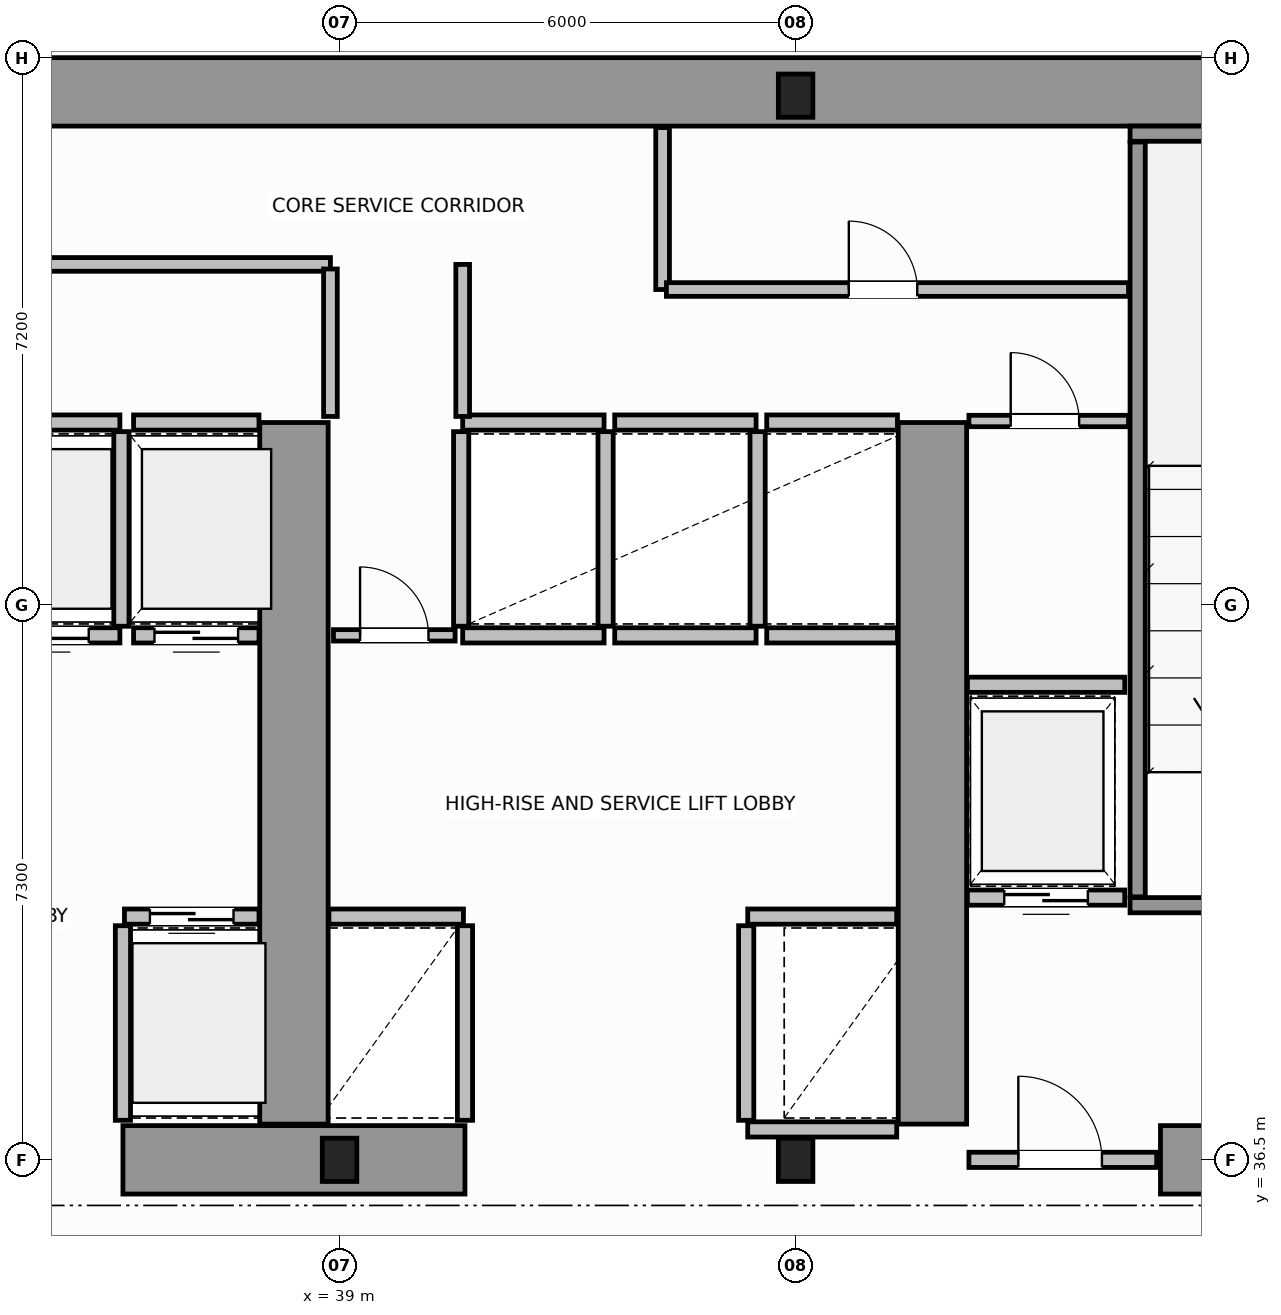
"""IFC4 building model, lengths in metres.
Left out: names, types, materials, properties, quantities, classifications, styles, units other than length and angle.
Written with IfcOpenShell. Run it as: python <this file> out.ifc"""

import sys

from ifc_helpers import new_model, si_unit, direction, frame, frame_2d, origin, origin_2d, place, context, subcontext, project, spatial, rectangle, i_section, extrude, source, transform, mapped, element, fill, save


model = new_model("IFC4")
c1 = context("Model", 3, precision=1e-05, world=origin(), true_north=direction((0.0, 1.0)))
c2 = subcontext(c1, "Body", "Model", "MODEL_VIEW")
j1 = project(units=[si_unit("LENGTHUNIT", "METRE"), si_unit("PLANEANGLEUNIT", "RADIAN")], contexts=[c1])
p1 = place(None, origin())
s1 = spatial("IfcSite", under=j1, at=p1, CompositionType="ELEMENT")
p2 = place(p1, origin())
s2 = spatial("IfcBuilding", under=s1, at=p2, CompositionType="ELEMENT")
p3 = place(p2, frame((0.0, 0.0, 14.4)))
s3 = spatial("IfcBuildingStorey", under=s2, at=p3, CompositionType="ELEMENT", Elevation=14.4)
m1 = source(origin(), c2, "Body", "SweptSolid", [
    extrude(i_section(OverallWidth=0.454, OverallDepth=0.569, WebThickness=0.078, FlangeThickness=0.08, FilletRadius=0.015, at=origin_2d()), origin(), (0.0, 0.0, 1.0), 4.4),
])
for number, where, z_axis, x_axis in (
    (1, (39.0, 36.5, 0.0), (0.0, 0.0, 1.0), (1.0, 0.0, 0.0)),
    (2, (45.0, 36.5, 0.0), (0.0, 0.0, 1.0), (1.0, 0.0, 0.0)),
    (3, (45.0, 50.5, 0.0), (0.0, 0.0, 1.0), (1.0, 0.0, 0.0)),
):
    element("IfcColumn", number, at=place(p3, frame(where, z_axis=z_axis, x_axis=x_axis)), inside=s3, PredefinedType="COLUMN", context=c2, shape_type="MappedRepresentation", body=[
        mapped(m1, transform((0.0, 0.0, 0.0), scale=1.0)),
    ])
p4 = place(p3, frame((34.002, 50.55, 0.0), z_axis=(0.0, 0.0, 1.0), x_axis=(1.0, 0.0, 0.0)))
e4 = element("IfcWall", 4, at=p4, inside=s3, PredefinedType="SHEAR", context=c2, shape_type="SweptSolid", body=[
    extrude(rectangle(XDim=19.544, YDim=0.9, at=frame_2d((9.772, 0.0))), origin(), (0.0, 0.0, 1.0), 4.4),
])
p5 = place(p3, frame((36.15, 36.5, 0.0), z_axis=(0.0, 0.0, 1.0), x_axis=(1.0, 0.0, 0.0)))
e5 = element("IfcWall", 5, at=p5, inside=s3, PredefinedType="SHEAR", context=c2, shape_type="SweptSolid", body=[
    extrude(rectangle(XDim=4.5, YDim=0.9, at=frame_2d((2.25, 0.0))), origin(), (0.0, 0.0, 1.0), 4.4),
])
p6 = place(p3, frame((49.8, 36.5, 0.0), z_axis=(0.0, 0.0, 1.0), x_axis=(1.0, 0.0, 0.0)))
e6 = element("IfcWall", 6, at=p6, inside=s3, PredefinedType="SHEAR", context=c2, shape_type="SweptSolid", body=[
    extrude(rectangle(XDim=3.73, YDim=0.9, at=frame_2d((1.865, 0.0))), origin(), (0.0, 0.0, 1.0), 2.92),
])
for number, where, z_axis, x_axis in (
    (7, (38.4, 36.97, 0.0), (0.0, 0.0, 1.0), (0.0, 1.0, 0.0)),
    (8, (46.8, 36.97, 0.0), (0.0, 0.0, 1.0), (0.0, 1.0, 0.0)),
):
    element("IfcWall", number, at=place(p3, frame(where, z_axis=z_axis, x_axis=x_axis)), inside=s3, PredefinedType="SHEAR", context=c2, shape_type="SweptSolid", body=[
        extrude(rectangle(XDim=9.23, YDim=0.9, at=frame_2d((4.615, 0.0))), origin(), (0.0, 0.0, 1.0), 4.4),
    ])
p7 = place(p3, frame((49.4, 39.85, 0.0), z_axis=(0.0, 0.0, 1.0), x_axis=(1.0, 0.0, 0.0)))
e9 = element("IfcWall", 9, at=p7, inside=s3, PredefinedType="SOLIDWALL", context=c2, shape_type="SweptSolid", body=[
    extrude(rectangle(XDim=4.15, YDim=0.2, at=frame_2d((2.075, 0.0))), origin(), (0.0, 0.0, 1.0), 4.4),
])
p8 = place(p7, frame((1.325, 0.0, 0.0)))
e10 = element("IfcOpeningElement", 10, at=p8, cuts=e9, PredefinedType="OPENING", context=c2, shape_type="SweptSolid", body=[
    extrude(rectangle(XDim=1.1, YDim=2.15, at=frame_2d((0.55, 1.075))), frame((0.0, 0.11, 0.0), z_axis=(0.0, -1.0, 0.0), x_axis=(1.0, 0.0, 0.0)), (0.0, 0.0, 1.0), 0.22),
])
p9 = place(p3, frame((49.4, 50.0, 0.0), z_axis=(0.0, 0.0, 1.0), x_axis=(1.0, 0.0, 0.0)))
e11 = element("IfcWall", 11, at=p9, inside=s3, PredefinedType="SOLIDWALL", context=c2, shape_type="SweptSolid", body=[
    extrude(rectangle(XDim=4.15, YDim=0.2, at=frame_2d((2.075, 0.0))), origin(), (0.0, 0.0, 1.0), 4.4),
])
p10 = place(p3, frame((49.5, 39.96, 0.0), z_axis=(0.0, 0.0, 1.0), x_axis=(0.0, 1.0, 0.0)))
e12 = element("IfcWall", 12, at=p10, inside=s3, PredefinedType="SOLIDWALL", context=c2, shape_type="SweptSolid", body=[
    extrude(rectangle(XDim=9.93, YDim=0.2, at=frame_2d((4.965, 0.0))), origin(), (0.0, 0.0, 1.0), 4.4),
])
p11 = place(p3, frame((47.28, 36.5, 0.0), z_axis=(0.0, 0.0, 1.0), x_axis=(1.0, 0.0, 0.0)))
e13 = element("IfcWall", 13, at=p11, inside=s3, PredefinedType="SOLIDWALL", context=c2, shape_type="SweptSolid", body=[
    extrude(rectangle(XDim=2.47, YDim=0.2, at=frame_2d((1.235, 0.0))), origin(), (0.0, 0.0, 1.0), 2.91),
])
p12 = place(p11, frame((0.65, 0.0, 0.0)))
e14 = element("IfcOpeningElement", 14, at=p12, cuts=e13, PredefinedType="OPENING", context=c2, shape_type="SweptSolid", body=[
    extrude(rectangle(XDim=1.1, YDim=2.15, at=frame_2d((0.55, 1.075))), frame((0.0, 0.11, 0.0), z_axis=(0.0, -1.0, 0.0), x_axis=(1.0, 0.0, 0.0)), (0.0, 0.0, 1.0), 0.22),
])
p13 = place(p3, frame((36.17, 39.7, 0.0), z_axis=(0.0, 0.0, 1.0), x_axis=(1.0, 0.0, 0.0)))
e15 = element("IfcWall", 15, at=p13, inside=s3, PredefinedType="SOLIDWALL", context=c2, shape_type="SweptSolid", body=[
    extrude(rectangle(XDim=1.77, YDim=0.2, at=frame_2d((0.885, 0.0))), origin(), (0.0, 0.0, 1.0), 4.12),
])
p14 = place(p13, frame((0.335, 0.0, 0.0)))
e16 = element("IfcOpeningElement", 16, at=p14, cuts=e15, PredefinedType="OPENING", context=c2, shape_type="SweptSolid", body=[
    extrude(rectangle(XDim=1.1, YDim=2.15, at=frame_2d((0.55, 1.075))), frame((0.0, 0.11, 0.0), z_axis=(0.0, -1.0, 0.0), x_axis=(1.0, 0.0, 0.0)), (0.0, 0.0, 1.0), 0.22),
])
p15 = place(p3, frame((36.15, 37.02, 0.0), z_axis=(0.0, 0.0, 1.0), x_axis=(0.0, 1.0, 0.0)))
e17 = element("IfcWall", 17, at=p15, inside=s3, PredefinedType="SOLIDWALL", context=c2, shape_type="SweptSolid", body=[
    extrude(rectangle(XDim=2.56, YDim=0.2, at=frame_2d((1.28, 0.0))), origin(), (0.0, 0.0, 1.0), 4.12),
])
p16 = place(p3, frame((34.19, 43.4, 0.0), z_axis=(0.0, 0.0, 1.0), x_axis=(1.0, 0.0, 0.0)))
e18 = element("IfcWall", 18, at=p16, inside=s3, PredefinedType="SOLIDWALL", context=c2, shape_type="SweptSolid", body=[
    extrude(rectangle(XDim=1.92, YDim=0.2, at=frame_2d((0.96, 0.0))), origin(), (0.0, 0.0, 1.0), 4.12),
])
p17 = place(p16, frame((0.41, 0.0, 0.0)))
e19 = element("IfcOpeningElement", 19, at=p17, cuts=e18, PredefinedType="OPENING", context=c2, shape_type="SweptSolid", body=[
    extrude(rectangle(XDim=1.1, YDim=2.15, at=frame_2d((0.55, 1.075))), frame((0.0, 0.11, 0.0), z_axis=(0.0, -1.0, 0.0), x_axis=(1.0, 0.0, 0.0)), (0.0, 0.0, 1.0), 0.22),
])
p18 = place(p3, frame((34.19, 46.2, 0.0), z_axis=(0.0, 0.0, 1.0), x_axis=(1.0, 0.0, 0.0)))
e20 = element("IfcWall", 20, at=p18, inside=s3, PredefinedType="SOLIDWALL", context=c2, shape_type="SweptSolid", body=[
    extrude(rectangle(XDim=1.92, YDim=0.2, at=frame_2d((0.96, 0.0))), origin(), (0.0, 0.0, 1.0), 4.12),
])
p19 = place(p3, frame((36.13, 43.52, 0.0), z_axis=(0.0, 0.0, 1.0), x_axis=(0.0, 1.0, 0.0)))
e21 = element("IfcWall", 21, at=p19, inside=s3, PredefinedType="SOLIDWALL", context=c2, shape_type="SweptSolid", body=[
    extrude(rectangle(XDim=2.56, YDim=0.2, at=frame_2d((1.28, 0.0))), origin(), (0.0, 0.0, 1.0), 4.12),
])
p20 = place(p3, frame((36.29, 43.4, 0.0), z_axis=(0.0, 0.0, 1.0), x_axis=(1.0, 0.0, 0.0)))
e22 = element("IfcWall", 22, at=p20, inside=s3, PredefinedType="SOLIDWALL", context=c2, shape_type="SweptSolid", body=[
    extrude(rectangle(XDim=1.65, YDim=0.2, at=frame_2d((0.825, 0.0))), origin(), (0.0, 0.0, 1.0), 4.12),
])
p21 = place(p20, frame((0.275, 0.0, 0.0)))
e23 = element("IfcOpeningElement", 23, at=p21, cuts=e22, PredefinedType="OPENING", context=c2, shape_type="SweptSolid", body=[
    extrude(rectangle(XDim=1.1, YDim=2.15, at=frame_2d((0.55, 1.075))), frame((0.0, 0.11, 0.0), z_axis=(0.0, -1.0, 0.0), x_axis=(1.0, 0.0, 0.0)), (0.0, 0.0, 1.0), 0.22),
])
p22 = place(p3, frame((36.29, 46.2, 0.0), z_axis=(0.0, 0.0, 1.0), x_axis=(1.0, 0.0, 0.0)))
e24 = element("IfcWall", 24, at=p22, inside=s3, PredefinedType="SOLIDWALL", context=c2, shape_type="SweptSolid", body=[
    extrude(rectangle(XDim=1.65, YDim=0.2, at=frame_2d((0.825, 0.0))), origin(), (0.0, 0.0, 1.0), 4.12),
])
p23 = place(p3, frame((38.86, 39.7, 0.0), z_axis=(0.0, 0.0, 1.0), x_axis=(1.0, 0.0, 0.0)))
e25 = element("IfcWall", 25, at=p23, inside=s3, PredefinedType="SOLIDWALL", context=c2, shape_type="SweptSolid", body=[
    extrude(rectangle(XDim=1.77, YDim=0.2, at=frame_2d((0.885, 0.0))), origin(), (0.0, 0.0, 1.0), 4.12),
])
p24 = place(p3, frame((40.65, 37.02, 0.0), z_axis=(0.0, 0.0, 1.0), x_axis=(0.0, 1.0, 0.0)))
e26 = element("IfcWall", 26, at=p24, inside=s3, PredefinedType="SOLIDWALL", context=c2, shape_type="SweptSolid", body=[
    extrude(rectangle(XDim=2.56, YDim=0.2, at=frame_2d((1.28, 0.0))), origin(), (0.0, 0.0, 1.0), 4.12),
])
p25 = place(p3, frame((44.37, 39.7, 0.0), z_axis=(0.0, 0.0, 1.0), x_axis=(1.0, 0.0, 0.0)))
e27 = element("IfcWall", 27, at=p25, inside=s3, PredefinedType="SOLIDWALL", context=c2, shape_type="SweptSolid", body=[
    extrude(rectangle(XDim=1.96, YDim=0.2, at=frame_2d((0.98, 0.0))), origin(), (0.0, 0.0, 1.0), 4.12),
])
p26 = place(p3, frame((44.37, 36.9, 0.0), z_axis=(0.0, 0.0, 1.0), x_axis=(1.0, 0.0, 0.0)))
e28 = element("IfcWall", 28, at=p26, inside=s3, PredefinedType="SOLIDWALL", context=c2, shape_type="SweptSolid", body=[
    extrude(rectangle(XDim=1.96, YDim=0.2, at=frame_2d((0.98, 0.0))), origin(), (0.0, 0.0, 1.0), 2.91),
])
p27 = place(p3, frame((44.35, 37.02, 0.0), z_axis=(0.0, 0.0, 1.0), x_axis=(0.0, 1.0, 0.0)))
e29 = element("IfcWall", 29, at=p27, inside=s3, PredefinedType="SOLIDWALL", context=c2, shape_type="SweptSolid", body=[
    extrude(rectangle(XDim=2.56, YDim=0.2, at=frame_2d((1.28, 0.0))), origin(), (0.0, 0.0, 1.0), 4.12),
])
for number, where, z_axis, x_axis in (
    (30, (40.62, 43.4, 0.0), (0.0, 0.0, 1.0), (1.0, 0.0, 0.0)),
    (31, (40.62, 46.2, 0.0), (0.0, 0.0, 1.0), (1.0, 0.0, 0.0)),
):
    element("IfcWall", number, at=place(p3, frame(where, z_axis=z_axis, x_axis=x_axis)), inside=s3, PredefinedType="SOLIDWALL", context=c2, shape_type="SweptSolid", body=[
        extrude(rectangle(XDim=1.86, YDim=0.2, at=frame_2d((0.93, 0.0))), origin(), (0.0, 0.0, 1.0), 4.12),
    ])
for number, where, z_axis, x_axis in (
    (32, (40.6, 43.52, 0.0), (0.0, 0.0, 1.0), (0.0, 1.0, 0.0)),
    (33, (42.5, 43.52, 0.0), (0.0, 0.0, 1.0), (0.0, 1.0, 0.0)),
):
    element("IfcWall", number, at=place(p3, frame(where, z_axis=z_axis, x_axis=x_axis)), inside=s3, PredefinedType="SOLIDWALL", context=c2, shape_type="SweptSolid", body=[
        extrude(rectangle(XDim=2.56, YDim=0.2, at=frame_2d((1.28, 0.0))), origin(), (0.0, 0.0, 1.0), 4.12),
    ])
for number, where, z_axis, x_axis in (
    (34, (42.62, 43.4, 0.0), (0.0, 0.0, 1.0), (1.0, 0.0, 0.0)),
    (35, (42.62, 46.2, 0.0), (0.0, 0.0, 1.0), (1.0, 0.0, 0.0)),
):
    element("IfcWall", number, at=place(p3, frame(where, z_axis=z_axis, x_axis=x_axis)), inside=s3, PredefinedType="SOLIDWALL", context=c2, shape_type="SweptSolid", body=[
        extrude(rectangle(XDim=1.86, YDim=0.2, at=frame_2d((0.93, 0.0))), origin(), (0.0, 0.0, 1.0), 4.12),
    ])
p28 = place(p3, frame((44.5, 43.52, 0.0), z_axis=(0.0, 0.0, 1.0), x_axis=(0.0, 1.0, 0.0)))
e36 = element("IfcWall", 36, at=p28, inside=s3, PredefinedType="SOLIDWALL", context=c2, shape_type="SweptSolid", body=[
    extrude(rectangle(XDim=2.56, YDim=0.2, at=frame_2d((1.28, 0.0))), origin(), (0.0, 0.0, 1.0), 2.91),
])
for number, where, z_axis, x_axis in (
    (37, (44.62, 43.4, 0.0), (0.0, 0.0, 1.0), (1.0, 0.0, 0.0)),
    (38, (44.62, 46.2, 0.0), (0.0, 0.0, 1.0), (1.0, 0.0, 0.0)),
):
    element("IfcWall", number, at=place(p3, frame(where, z_axis=z_axis, x_axis=x_axis)), inside=s3, PredefinedType="SOLIDWALL", context=c2, shape_type="SweptSolid", body=[
        extrude(rectangle(XDim=1.72, YDim=0.2, at=frame_2d((0.86, 0.0))), origin(), (0.0, 0.0, 1.0), 4.12),
    ])
p29 = place(p3, frame((47.26, 39.95, 0.0), z_axis=(0.0, 0.0, 1.0), x_axis=(1.0, 0.0, 0.0)))
e39 = element("IfcWall", 39, at=p29, inside=s3, PredefinedType="SOLIDWALL", context=c2, shape_type="SweptSolid", body=[
    extrude(rectangle(XDim=2.07, YDim=0.2, at=frame_2d((1.035, 0.0))), origin(), (0.0, 0.0, 1.0), 4.12),
])
p30 = place(p29, frame((0.485, 0.0, 0.0)))
e40 = element("IfcOpeningElement", 40, at=p30, cuts=e39, PredefinedType="OPENING", context=c2, shape_type="SweptSolid", body=[
    extrude(rectangle(XDim=1.1, YDim=2.15, at=frame_2d((0.55, 1.075))), frame((0.0, 0.11, 0.0), z_axis=(0.0, -1.0, 0.0), x_axis=(1.0, 0.0, 0.0)), (0.0, 0.0, 1.0), 0.22),
])
p31 = place(p3, frame((47.26, 42.75, 0.0), z_axis=(0.0, 0.0, 1.0), x_axis=(1.0, 0.0, 0.0)))
e41 = element("IfcWall", 41, at=p31, inside=s3, PredefinedType="SOLIDWALL", context=c2, shape_type="SweptSolid", body=[
    extrude(rectangle(XDim=2.07, YDim=0.2, at=frame_2d((1.035, 0.0))), origin(), (0.0, 0.0, 1.0), 4.12),
])
p32 = place(p3, frame((47.28, 46.22, 0.0), z_axis=(0.0, 0.0, 1.0), x_axis=(1.0, 0.0, 0.0)))
e42 = element("IfcWall", 42, at=p32, inside=s3, PredefinedType="PARTITIONING", context=c2, shape_type="SweptSolid", body=[
    extrude(rectangle(XDim=2.1, YDim=0.15, at=frame_2d((1.05, 0.0))), origin(), (0.0, 0.0, 1.0), 4.12),
])
p33 = place(p32, frame((0.55, 0.0, 0.0)))
e43 = element("IfcOpeningElement", 43, at=p33, cuts=e42, PredefinedType="OPENING", context=c2, shape_type="SweptSolid", body=[
    extrude(rectangle(XDim=0.9, YDim=2.1, at=frame_2d((0.45, 1.05))), frame((0.0, 0.085, 0.0), z_axis=(0.0, -1.0, 0.0), x_axis=(1.0, 0.0, 0.0)), (0.0, 0.0, 1.0), 0.17),
])
p34 = place(p3, frame((38.92, 43.4, 0.0), z_axis=(0.0, 0.0, 1.0), x_axis=(1.0, 0.0, 0.0)))
e44 = element("IfcWall", 44, at=p34, inside=s3, PredefinedType="PARTITIONING", context=c2, shape_type="SweptSolid", body=[
    extrude(rectangle(XDim=1.6, YDim=0.15, at=frame_2d((0.8, 0.0))), origin(), (0.0, 0.0, 1.0), 4.12),
])
p35 = place(p34, frame((0.35, 0.0, 0.0)))
e45 = element("IfcOpeningElement", 45, at=p35, cuts=e44, PredefinedType="OPENING", context=c2, shape_type="SweptSolid", body=[
    extrude(rectangle(XDim=0.9, YDim=2.1, at=frame_2d((0.45, 1.05))), frame((0.0, 0.085, 0.0), z_axis=(0.0, -1.0, 0.0), x_axis=(1.0, 0.0, 0.0)), (0.0, 0.0, 1.0), 0.17),
])
p36 = place(p3, frame((23.85, 48.28, 0.0), z_axis=(0.0, 0.0, 1.0), x_axis=(1.0, 0.0, 0.0)))
e46 = element("IfcWall", 46, at=p36, inside=s3, PredefinedType="PLUMBINGWALL", context=c2, shape_type="SweptSolid", body=[
    extrude(rectangle(XDim=15.03, YDim=0.18, at=frame_2d((7.515, 0.0))), origin(), (0.0, 0.0, 1.0), 4.12),
])
p37 = place(p36, frame((2.9, 0.0, 0.0)))
e47 = element("IfcOpeningElement", 47, at=p37, cuts=e46, PredefinedType="OPENING", context=c2, shape_type="SweptSolid", body=[
    extrude(rectangle(XDim=0.9, YDim=2.15, at=frame_2d((0.45, 1.075))), frame((0.0, 0.1, 0.0), z_axis=(0.0, -1.0, 0.0), x_axis=(1.0, 0.0, 0.0)), (0.0, 0.0, 1.0), 0.2),
])
p38 = place(p36, frame((10.4, 0.0, 0.0)))
e48 = element("IfcOpeningElement", 48, at=p38, cuts=e46, PredefinedType="OPENING", context=c2, shape_type="SweptSolid", body=[
    extrude(rectangle(XDim=0.9, YDim=2.15, at=frame_2d((0.45, 1.075))), frame((0.0, 0.1, 0.0), z_axis=(0.0, -1.0, 0.0), x_axis=(1.0, 0.0, 0.0)), (0.0, 0.0, 1.0), 0.2),
])
p39 = place(p3, frame((38.88, 46.28, 0.0), z_axis=(0.0, 0.0, 1.0), x_axis=(0.0, 1.0, 0.0)))
e49 = element("IfcWall", 49, at=p39, inside=s3, PredefinedType="PLUMBINGWALL", context=c2, shape_type="SweptSolid", body=[
    extrude(rectangle(XDim=1.94, YDim=0.18, at=frame_2d((0.97, 0.0))), origin(), (0.0, 0.0, 1.0), 4.12),
])
p40 = place(p3, frame((40.62, 46.28, 0.0), z_axis=(0.0, 0.0, 1.0), x_axis=(0.0, 1.0, 0.0)))
e50 = element("IfcWall", 50, at=p40, inside=s3, PredefinedType="PLUMBINGWALL", context=c2, shape_type="SweptSolid", body=[
    extrude(rectangle(XDim=2.0, YDim=0.18, at=frame_2d((1.0, 0.0))), origin(), (0.0, 0.0, 1.0), 4.12),
])
p41 = place(p3, frame((43.25, 47.95, 0.0), z_axis=(0.0, 0.0, 1.0), x_axis=(0.0, 1.0, 0.0)))
e51 = element("IfcWall", 51, at=p41, inside=s3, PredefinedType="PLUMBINGWALL", context=c2, shape_type="SweptSolid", body=[
    extrude(rectangle(XDim=2.13, YDim=0.18, at=frame_2d((1.065, 0.0))), origin(), (0.0, 0.0, 1.0), 4.12),
])
p42 = place(p3, frame((43.3, 47.95, 0.0), z_axis=(0.0, 0.0, 1.0), x_axis=(1.0, 0.0, 0.0)))
e52 = element("IfcWall", 52, at=p42, inside=s3, PredefinedType="PLUMBINGWALL", context=c2, shape_type="SweptSolid", body=[
    extrude(rectangle(XDim=6.08, YDim=0.18, at=frame_2d((3.04, 0.0))), origin(), (0.0, 0.0, 1.0), 4.12),
])
p43 = place(p42, frame((2.4, 0.0, 0.0)))
e53 = element("IfcOpeningElement", 53, at=p43, cuts=e52, PredefinedType="OPENING", context=c2, shape_type="SweptSolid", body=[
    extrude(rectangle(XDim=0.9, YDim=2.15, at=frame_2d((0.45, 1.075))), frame((0.0, 0.1, 0.0), z_axis=(0.0, -1.0, 0.0), x_axis=(1.0, 0.0, 0.0)), (0.0, 0.0, 1.0), 0.2),
])
m2 = source(origin(), c2, "Body", "SweptSolid", [
    extrude(rectangle(XDim=1.1, YDim=2.15, at=frame_2d((0.55, 1.075))), frame((0.0, 0.025, 0.0), z_axis=(0.0, -1.0, 0.0), x_axis=(1.0, 0.0, 0.0)), (0.0, 0.0, 1.0), 0.05),
])
p44 = place(p12, origin())
e54 = element("IfcDoor", 54, at=p44, inside=s3, OperationType="SINGLE_SWING_LEFT", PredefinedType="DOOR", context=c2, shape_type="MappedRepresentation", body=[
    mapped(m2, transform((0.0, 0.0, 0.0), scale=1.0)),
])
fill(e14, e54)
p45 = place(p14, origin())
e55 = element("IfcDoor", 55, at=p45, inside=s3, OperationType="DOUBLE_DOOR_SLIDING", PredefinedType="DOOR", context=c2, shape_type="MappedRepresentation", body=[
    mapped(m2, transform((0.0, 0.0, 0.0), scale=1.0)),
])
fill(e16, e55)
p46 = place(p17, origin())
e56 = element("IfcDoor", 56, at=p46, inside=s3, OperationType="DOUBLE_DOOR_SLIDING", PredefinedType="DOOR", context=c2, shape_type="MappedRepresentation", body=[
    mapped(m2, transform((0.0, 0.0, 0.0), scale=1.0)),
])
fill(e19, e56)
p47 = place(p21, origin())
e57 = element("IfcDoor", 57, at=p47, inside=s3, OperationType="DOUBLE_DOOR_SLIDING", PredefinedType="DOOR", context=c2, shape_type="MappedRepresentation", body=[
    mapped(m2, transform((0.0, 0.0, 0.0), scale=1.0)),
])
fill(e23, e57)
p48 = place(p30, origin())
e58 = element("IfcDoor", 58, at=p48, inside=s3, OperationType="DOUBLE_DOOR_SLIDING", PredefinedType="DOOR", context=c2, shape_type="MappedRepresentation", body=[
    mapped(m2, transform((0.0, 0.0, 0.0), scale=1.0)),
])
fill(e40, e58)
m3 = source(origin(), c2, "Body", "SweptSolid", [
    extrude(rectangle(XDim=0.9, YDim=2.1, at=frame_2d((0.45, 1.05))), frame((0.0, 0.025, 0.0), z_axis=(0.0, -1.0, 0.0), x_axis=(1.0, 0.0, 0.0)), (0.0, 0.0, 1.0), 0.05),
])
p49 = place(p33, origin())
e59 = element("IfcDoor", 59, at=p49, inside=s3, OperationType="SINGLE_SWING_RIGHT", PredefinedType="DOOR", context=c2, shape_type="MappedRepresentation", body=[
    mapped(m3, transform((0.0, 0.0, 0.0), scale=1.0)),
])
fill(e43, e59)
p50 = place(p35, origin())
e60 = element("IfcDoor", 60, at=p50, inside=s3, OperationType="SINGLE_SWING_LEFT", PredefinedType="DOOR", context=c2, shape_type="MappedRepresentation", body=[
    mapped(m3, transform((0.0, 0.0, 0.0), scale=1.0)),
])
fill(e45, e60)
m4 = source(origin(), c2, "Body", "SweptSolid", [
    extrude(rectangle(XDim=0.9, YDim=2.15, at=frame_2d((0.45, 1.075))), frame((0.0, 0.025, 0.0), z_axis=(0.0, -1.0, 0.0), x_axis=(1.0, 0.0, 0.0)), (0.0, 0.0, 1.0), 0.05),
])
p51 = place(p43, origin())
e61 = element("IfcDoor", 61, at=p51, inside=s3, OperationType="SINGLE_SWING_RIGHT", PredefinedType="DOOR", context=c2, shape_type="MappedRepresentation", body=[
    mapped(m4, transform((0.0, 0.0, 0.0), scale=1.0)),
])
fill(e53, e61)
save(model, sys.argv[1])
